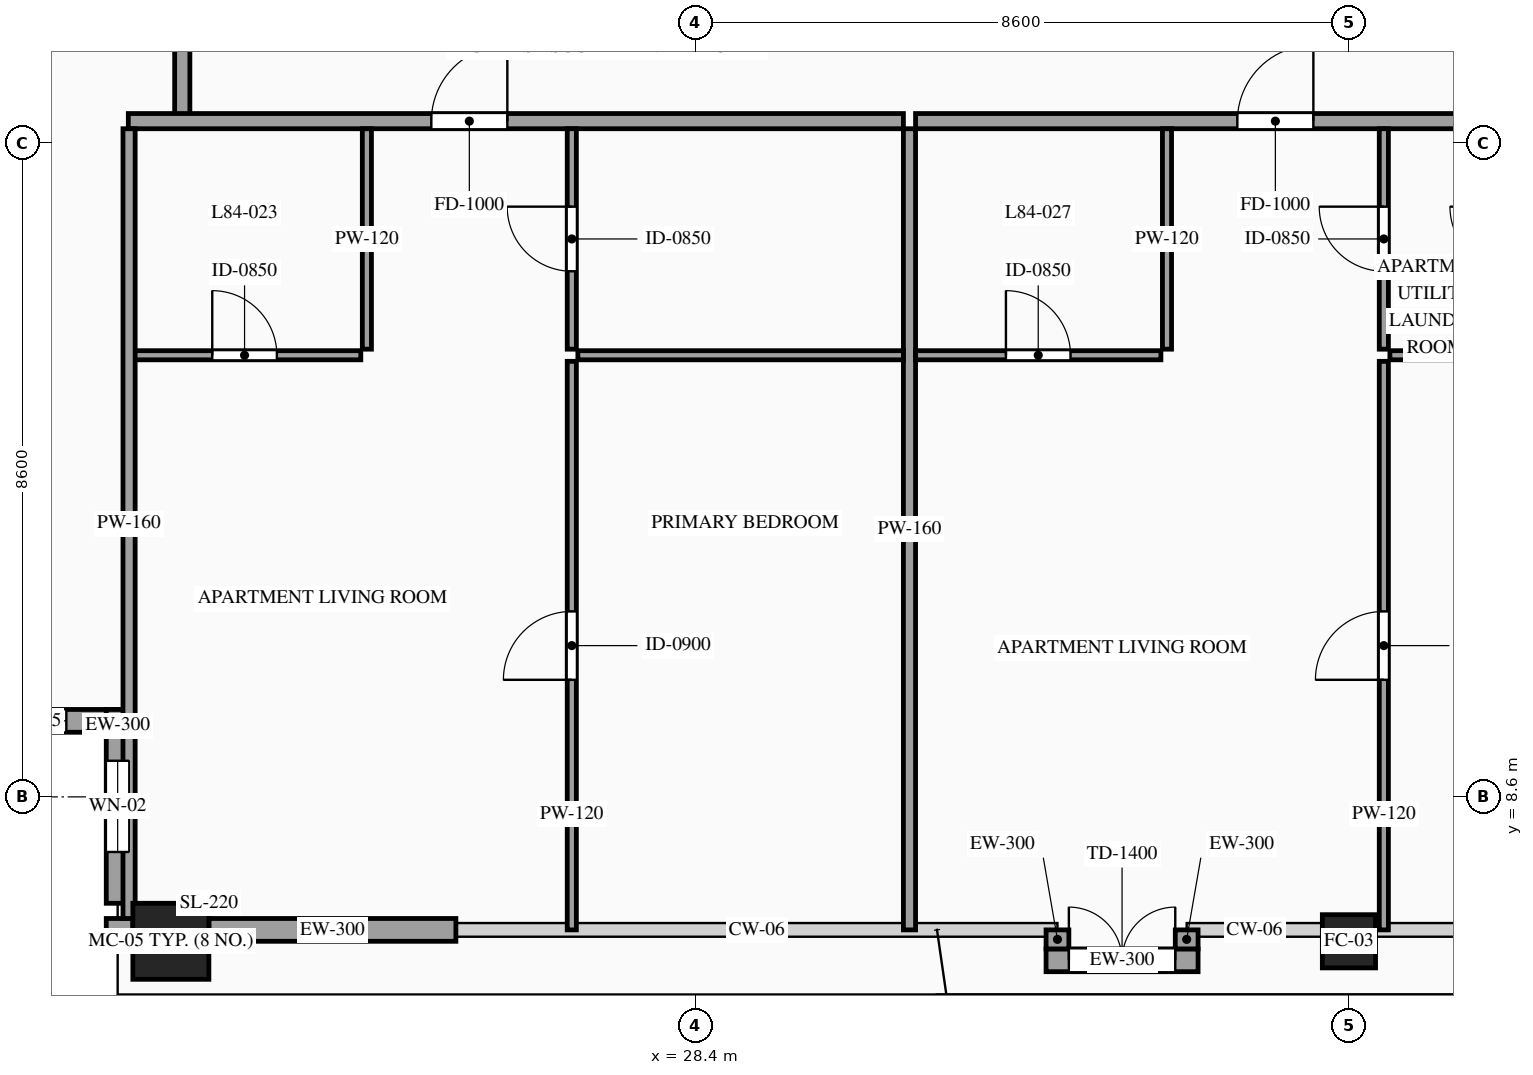
"""IFC4 building model, lengths in metres.
Left out: names, types, materials, properties, quantities, classifications, styles, units other than length and angle.
Written with IfcOpenShell. Run it as: python <this file> out.ifc"""

import sys

from ifc_helpers import new_model, si_unit, direction, frame, frame_2d, origin, origin_2d, place, context, subcontext, project, spatial, rectangle, hollow_rectangle, extrude, source, transform, mapped, element, fill, save


model = new_model("IFC4")
c1 = context("Model", 3, precision=1e-05, world=origin(), true_north=direction((0.0, 1.0)))
c2 = subcontext(c1, "Body", "Model", "MODEL_VIEW")
j1 = project(units=[si_unit("LENGTHUNIT", "METRE"), si_unit("PLANEANGLEUNIT", "RADIAN")], contexts=[c1])
p1 = place(None, origin())
s1 = spatial("IfcSite", under=j1, at=p1, CompositionType="ELEMENT")
p2 = place(p1, origin())
s2 = spatial("IfcBuilding", under=s1, at=p2, CompositionType="ELEMENT")
p3 = place(p2, frame((0.0, 0.0, 314.7)))
s3 = spatial("IfcBuildingStorey", under=s2, at=p3, CompositionType="ELEMENT", Elevation=314.7)
m1 = source(origin(), c2, "Body", "SweptSolid", [
    extrude(hollow_rectangle(XDim=1.0, YDim=1.0, WallThickness=0.048, at=origin_2d()), origin(), (0.0, 0.0, 1.0), 3.5),
])
p4 = place(p3, frame((21.5, 6.7, 0.0), z_axis=(0.0, 0.0, 1.0), x_axis=(1.0, 0.0, 0.0)))
e1 = element("IfcColumn", 1, at=p4, inside=s3, PredefinedType="COLUMN", context=c2, shape_type="MappedRepresentation", body=[
    mapped(m1, transform((0.0, 0.0, 0.0), scale=1.0)),
])
m2 = source(origin(), c2, "Body", "SweptSolid", [
    extrude(hollow_rectangle(XDim=0.7, YDim=0.7, WallThickness=0.032, at=origin_2d()), origin(), (0.0, 0.0, 1.0), 3.5),
])
p5 = place(p3, frame((37.0, 6.7, 0.0), z_axis=(0.0, 0.0, 1.0), x_axis=(1.0, 0.0, 0.0)))
e2 = element("IfcColumn", 2, at=p5, inside=s3, PredefinedType="COLUMN", context=c2, shape_type="MappedRepresentation", body=[
    mapped(m2, transform((0.0, 0.0, 0.0), scale=1.0)),
])
p6 = place(p3, frame((18.4, 9.6, 0.0), z_axis=(0.0, 0.0, 1.0), x_axis=(1.0, 0.0, 0.0)))
e3 = element("IfcWall", 3, at=p6, inside=s3, PredefinedType="SOLIDWALL", context=c2, shape_type="SweptSolid", body=[
    extrude(rectangle(XDim=2.55, YDim=0.3, at=frame_2d((1.275, 0.0))), origin(), (0.0, 0.0, 1.0), 3.28),
])
p7 = place(p6, frame((0.825, 0.0, 0.85)))
e4 = element("IfcOpeningElement", 4, at=p7, cuts=e3, PredefinedType="OPENING", context=c2, shape_type="SweptSolid", body=[
    extrude(rectangle(XDim=0.9, YDim=1.5, at=frame_2d((0.45, 0.75))), frame((0.0, 0.165, 0.0), z_axis=(0.0, -1.0, 0.0), x_axis=(1.0, 0.0, 0.0)), (0.0, 0.0, 1.0), 0.33),
])
p8 = place(p3, frame((20.8, 9.75, 0.0), z_axis=(0.0, 0.0, 1.0), x_axis=(0.0, -1.0, 0.0)))
e5 = element("IfcWall", 5, at=p8, inside=s3, PredefinedType="SOLIDWALL", context=c2, shape_type="SweptSolid", body=[
    extrude(rectangle(XDim=2.55, YDim=0.3, at=frame_2d((1.275, 0.0))), origin(), (0.0, 0.0, 1.0), 3.28),
])
p9 = place(p8, frame((0.675, 0.0, 0.85)))
e6 = element("IfcOpeningElement", 6, at=p9, cuts=e5, PredefinedType="OPENING", context=c2, shape_type="SweptSolid", body=[
    extrude(rectangle(XDim=1.2, YDim=2.1, at=frame_2d((0.6, 1.05))), frame((0.0, 0.165, 0.0), z_axis=(0.0, -1.0, 0.0), x_axis=(1.0, 0.0, 0.0)), (0.0, 0.0, 1.0), 0.33),
])
m3 = source(origin(), c2, "Body", "SweptSolid", [
    extrude(rectangle(XDim=0.35, YDim=0.3, at=frame_2d((0.175, 0.0))), origin(), (0.0, 0.0, 1.0), 3.28),
])
p10 = place(p3, frame((20.65, 6.85, 0.0), z_axis=(0.0, 0.0, 1.0), x_axis=(1.0, 0.0, 0.0)))
e7 = element("IfcWall", 7, at=p10, inside=s3, PredefinedType="SOLIDWALL", context=c2, shape_type="MappedRepresentation", body=[
    mapped(m3, transform((0.0, 0.0, 0.0), scale=1.0)),
])
m4 = source(origin(), c2, "Body", "SweptSolid", [
    extrude(rectangle(XDim=3.25, YDim=0.3, at=frame_2d((1.625, 0.0))), origin(), (0.0, 0.0, 1.0), 2.885),
])
p11 = place(p3, frame((22.0, 6.85, 0.0), z_axis=(0.0, 0.0, 1.0), x_axis=(1.0, 0.0, 0.0)))
e8 = element("IfcWall", 8, at=p11, inside=s3, PredefinedType="SOLIDWALL", context=c2, shape_type="MappedRepresentation", body=[
    mapped(m4, transform((0.0, 0.0, 0.0), scale=1.0)),
])
p12 = place(p3, frame((33.015, 6.45, 0.0), z_axis=(0.0, 0.0, 1.0), x_axis=(1.0, 0.0, 0.0)))
e9 = element("IfcWall", 9, at=p12, inside=s3, PredefinedType="SOLIDWALL", context=c2, shape_type="SweptSolid", body=[
    extrude(rectangle(XDim=2.0, YDim=0.3, at=frame_2d((1.0, 0.0))), origin(), (0.0, 0.0, 1.0), 2.885),
])
p13 = place(p12, frame((0.3, 0.0, 0.0)))
e10 = element("IfcOpeningElement", 10, at=p13, cuts=e9, PredefinedType="OPENING", context=c2, shape_type="SweptSolid", body=[
    extrude(rectangle(XDim=1.4, YDim=2.3, at=frame_2d((0.7, 1.15))), frame((0.0, 0.165, 0.0), z_axis=(0.0, -1.0, 0.0), x_axis=(1.0, 0.0, 0.0)), (0.0, 0.0, 1.0), 0.33),
])
m5 = source(origin(), c2, "Body", "SweptSolid", [
    extrude(rectangle(XDim=0.25, YDim=0.3, at=frame_2d((0.125, 0.0))), origin(), (0.0, 0.0, 1.0), 3.28),
])
for number, where, z_axis, x_axis in (
    (11, (33.165, 6.85, 0.0), (0.0, 0.0, 1.0), (0.0, -1.0, 0.0)),
    (12, (34.865, 6.6, 0.0), (0.0, 0.0, 1.0), (0.0, 1.0, 0.0)),
):
    element("IfcWall", number, at=place(p3, frame(where, z_axis=z_axis, x_axis=x_axis)), inside=s3, PredefinedType="SOLIDWALL", context=c2, shape_type="MappedRepresentation", body=[
        mapped(m5, transform((0.0, 0.0, 0.0), scale=1.0)),
    ])
m6 = source(origin(), c2, "Body", "SweptSolid", [
    extrude(rectangle(XDim=1.7, YDim=0.2, at=frame_2d((0.85, 0.0))), origin(), (0.0, 0.0, 1.0), 3.28),
])
p14 = place(p3, frame((21.65, 17.55, 0.0), z_axis=(0.0, 0.0, 1.0), x_axis=(0.0, 1.0, 0.0)))
e13 = element("IfcWall", 13, at=p14, inside=s3, PredefinedType="PARTITIONING", context=c2, shape_type="MappedRepresentation", body=[
    mapped(m6, transform((0.0, 0.0, 0.0), scale=1.0)),
])
p15 = place(p3, frame((20.94, 17.49, 0.0), z_axis=(0.0, 0.0, 1.0), x_axis=(1.0, 0.0, 0.0)))
e14 = element("IfcWall", 14, at=p15, inside=s3, PredefinedType="PARTITIONING", context=c2, shape_type="SweptSolid", body=[
    extrude(rectangle(XDim=10.198, YDim=0.2, at=frame_2d((5.099, 0.0))), origin(), (0.0, 0.0, 1.0), 3.28),
])
p16 = place(p15, frame((3.987, 0.0, 0.0)))
e15 = element("IfcOpeningElement", 15, at=p16, cuts=e14, PredefinedType="OPENING", context=c2, shape_type="SweptSolid", body=[
    extrude(rectangle(XDim=1.0, YDim=2.2, at=frame_2d((0.5, 1.1))), frame((0.0, 0.115, 0.0), z_axis=(0.0, -1.0, 0.0), x_axis=(1.0, 0.0, 0.0)), (0.0, 0.0, 1.0), 0.23),
])
m7 = source(origin(), c2, "Body", "SweptSolid", [
    extrude(rectangle(XDim=10.54, YDim=0.16, at=frame_2d((5.27, 0.0))), origin(), (0.0, 0.0, 1.0), 3.28),
])
p17 = place(p3, frame((31.218, 6.85, 0.0), z_axis=(0.0, 0.0, 1.0), x_axis=(0.0, 1.0, 0.0)))
e16 = element("IfcWall", 16, at=p17, inside=s3, PredefinedType="PARTITIONING", context=c2, shape_type="MappedRepresentation", body=[
    mapped(m7, transform((0.0, 0.0, 0.0), scale=1.0)),
])
p18 = place(p3, frame((20.94, 14.41, 0.0), z_axis=(0.0, 0.0, 1.0), x_axis=(1.0, 0.0, 0.0)))
e17 = element("IfcWall", 17, at=p18, inside=s3, PredefinedType="PARTITIONING", context=c2, shape_type="SweptSolid", body=[
    extrude(rectangle(XDim=3.059, YDim=0.12, at=frame_2d((1.53, 0.0))), origin(), (0.0, 0.0, 1.0), 3.28),
])
p19 = place(p18, frame((1.104, 0.0, 0.0)))
e18 = element("IfcOpeningElement", 18, at=p19, cuts=e17, PredefinedType="OPENING", context=c2, shape_type="SweptSolid", body=[
    extrude(rectangle(XDim=0.85, YDim=2.1, at=frame_2d((0.425, 1.05))), frame((0.0, 0.075, 0.0), z_axis=(0.0, -1.0, 0.0), x_axis=(1.0, 0.0, 0.0)), (0.0, 0.0, 1.0), 0.15),
])
m8 = source(origin(), c2, "Body", "SweptSolid", [
    extrude(rectangle(XDim=2.9, YDim=0.12, at=frame_2d((1.45, 0.0))), origin(), (0.0, 0.0, 1.0), 3.28),
])
p20 = place(p3, frame((24.079, 14.49, 0.0), z_axis=(0.0, 0.0, 1.0), x_axis=(0.0, 1.0, 0.0)))
e19 = element("IfcWall", 19, at=p20, inside=s3, PredefinedType="PARTITIONING", context=c2, shape_type="MappedRepresentation", body=[
    mapped(m8, transform((0.0, 0.0, 0.0), scale=1.0)),
])
m9 = source(origin(), c2, "Body", "SweptSolid", [
    extrude(rectangle(XDim=4.283, YDim=0.12, at=frame_2d((2.142, 0.0))), origin(), (0.0, 0.0, 1.0), 3.28),
])
p21 = place(p3, frame((26.855, 14.41, 0.0), z_axis=(0.0, 0.0, 1.0), x_axis=(1.0, 0.0, 0.0)))
e20 = element("IfcWall", 20, at=p21, inside=s3, PredefinedType="PARTITIONING", context=c2, shape_type="MappedRepresentation", body=[
    mapped(m9, transform((0.0, 0.0, 0.0), scale=1.0)),
])
p22 = place(p3, frame((26.775, 14.49, 0.0), z_axis=(0.0, 0.0, 1.0), x_axis=(0.0, 1.0, 0.0)))
e21 = element("IfcWall", 21, at=p22, inside=s3, PredefinedType="PARTITIONING", context=c2, shape_type="SweptSolid", body=[
    extrude(rectangle(XDim=2.9, YDim=0.12, at=frame_2d((1.45, 0.0))), origin(), (0.0, 0.0, 1.0), 3.28),
])
p23 = place(p22, frame((1.025, 0.0, 0.0)))
e22 = element("IfcOpeningElement", 22, at=p23, cuts=e21, PredefinedType="OPENING", context=c2, shape_type="SweptSolid", body=[
    extrude(rectangle(XDim=0.85, YDim=2.1, at=frame_2d((0.425, 1.05))), frame((0.0, 0.075, 0.0), z_axis=(0.0, -1.0, 0.0), x_axis=(1.0, 0.0, 0.0)), (0.0, 0.0, 1.0), 0.15),
])
p24 = place(p3, frame((26.775, 6.85, 0.0), z_axis=(0.0, 0.0, 1.0), x_axis=(0.0, 1.0, 0.0)))
e23 = element("IfcWall", 23, at=p24, inside=s3, PredefinedType="PARTITIONING", context=c2, shape_type="SweptSolid", body=[
    extrude(rectangle(XDim=7.48, YDim=0.12, at=frame_2d((3.74, 0.0))), origin(), (0.0, 0.0, 1.0), 3.28),
])
p25 = place(p24, frame((3.29, 0.0, 0.0)))
e24 = element("IfcOpeningElement", 24, at=p25, cuts=e23, PredefinedType="OPENING", context=c2, shape_type="SweptSolid", body=[
    extrude(rectangle(XDim=0.9, YDim=2.15, at=frame_2d((0.45, 1.075))), frame((0.0, 0.075, 0.0), z_axis=(0.0, -1.0, 0.0), x_axis=(1.0, 0.0, 0.0)), (0.0, 0.0, 1.0), 0.15),
])
p26 = place(p3, frame((31.298, 17.49, 0.0), z_axis=(0.0, 0.0, 1.0), x_axis=(1.0, 0.0, 0.0)))
e25 = element("IfcWall", 25, at=p26, inside=s3, PredefinedType="PARTITIONING", context=c2, shape_type="SweptSolid", body=[
    extrude(rectangle(XDim=10.761, YDim=0.2, at=frame_2d((5.38, 0.0))), origin(), (0.0, 0.0, 1.0), 3.28),
])
p27 = place(p26, frame((4.234, 0.0, 0.0)))
e26 = element("IfcOpeningElement", 26, at=p27, cuts=e25, PredefinedType="OPENING", context=c2, shape_type="SweptSolid", body=[
    extrude(rectangle(XDim=1.0, YDim=2.2, at=frame_2d((0.5, 1.1))), frame((0.0, 0.115, 0.0), z_axis=(0.0, -1.0, 0.0), x_axis=(1.0, 0.0, 0.0)), (0.0, 0.0, 1.0), 0.23),
])
p28 = place(p3, frame((31.298, 14.41, 0.0), z_axis=(0.0, 0.0, 1.0), x_axis=(1.0, 0.0, 0.0)))
e27 = element("IfcWall", 27, at=p28, inside=s3, PredefinedType="PARTITIONING", context=c2, shape_type="SweptSolid", body=[
    extrude(rectangle(XDim=3.228, YDim=0.12, at=frame_2d((1.614, 0.0))), origin(), (0.0, 0.0, 1.0), 3.28),
])
p29 = place(p28, frame((1.189, 0.0, 0.0)))
e28 = element("IfcOpeningElement", 28, at=p29, cuts=e27, PredefinedType="OPENING", context=c2, shape_type="SweptSolid", body=[
    extrude(rectangle(XDim=0.85, YDim=2.1, at=frame_2d((0.425, 1.05))), frame((0.0, 0.075, 0.0), z_axis=(0.0, -1.0, 0.0), x_axis=(1.0, 0.0, 0.0)), (0.0, 0.0, 1.0), 0.15),
])
p30 = place(p3, frame((34.606, 14.49, 0.0), z_axis=(0.0, 0.0, 1.0), x_axis=(0.0, 1.0, 0.0)))
e29 = element("IfcWall", 29, at=p30, inside=s3, PredefinedType="PARTITIONING", context=c2, shape_type="MappedRepresentation", body=[
    mapped(m8, transform((0.0, 0.0, 0.0), scale=1.0)),
])
m10 = source(origin(), c2, "Body", "SweptSolid", [
    extrude(rectangle(XDim=4.52, YDim=0.12, at=frame_2d((2.26, 0.0))), origin(), (0.0, 0.0, 1.0), 3.28),
])
p31 = place(p3, frame((37.539, 14.41, 0.0), z_axis=(0.0, 0.0, 1.0), x_axis=(1.0, 0.0, 0.0)))
e30 = element("IfcWall", 30, at=p31, inside=s3, PredefinedType="PARTITIONING", context=c2, shape_type="MappedRepresentation", body=[
    mapped(m10, transform((0.0, 0.0, 0.0), scale=1.0)),
])
p32 = place(p3, frame((37.459, 6.85, 0.0), z_axis=(0.0, 0.0, 1.0), x_axis=(0.0, 1.0, 0.0)))
e31 = element("IfcWall", 31, at=p32, inside=s3, PredefinedType="PARTITIONING", context=c2, shape_type="SweptSolid", body=[
    extrude(rectangle(XDim=7.48, YDim=0.12, at=frame_2d((3.74, 0.0))), origin(), (0.0, 0.0, 1.0), 3.28),
])
p33 = place(p32, frame((3.29, 0.0, 0.0)))
e32 = element("IfcOpeningElement", 32, at=p33, cuts=e31, PredefinedType="OPENING", context=c2, shape_type="SweptSolid", body=[
    extrude(rectangle(XDim=0.9, YDim=2.15, at=frame_2d((0.45, 1.075))), frame((0.0, 0.075, 0.0), z_axis=(0.0, -1.0, 0.0), x_axis=(1.0, 0.0, 0.0)), (0.0, 0.0, 1.0), 0.15),
])
p34 = place(p3, frame((37.459, 14.49, 0.0), z_axis=(0.0, 0.0, 1.0), x_axis=(0.0, 1.0, 0.0)))
e33 = element("IfcWall", 33, at=p34, inside=s3, PredefinedType="PARTITIONING", context=c2, shape_type="SweptSolid", body=[
    extrude(rectangle(XDim=2.9, YDim=0.12, at=frame_2d((1.45, 0.0))), origin(), (0.0, 0.0, 1.0), 3.28),
])
p35 = place(p34, frame((1.025, 0.0, 0.0)))
e34 = element("IfcOpeningElement", 34, at=p35, cuts=e33, PredefinedType="OPENING", context=c2, shape_type="SweptSolid", body=[
    extrude(rectangle(XDim=0.85, YDim=2.1, at=frame_2d((0.425, 1.05))), frame((0.0, 0.075, 0.0), z_axis=(0.0, -1.0, 0.0), x_axis=(1.0, 0.0, 0.0)), (0.0, 0.0, 1.0), 0.15),
])
m11 = source(origin(), c2, "Body", "SweptSolid", [
    extrude(rectangle(XDim=10.39, YDim=0.16, at=frame_2d((5.195, 0.0))), origin(), (0.0, 0.0, 1.0), 3.28),
])
p36 = place(p3, frame((20.95, 7.0, 0.0), z_axis=(0.0, 0.0, 1.0), x_axis=(0.0, 1.0, 0.0)))
e35 = element("IfcWall", 35, at=p36, inside=s3, PredefinedType="PARTITIONING", context=c2, shape_type="MappedRepresentation", body=[
    mapped(m11, transform((0.0, 0.0, 0.0), scale=1.0)),
])
m12 = source(origin(), c2, "Body", "SweptSolid", [
    extrude(rectangle(XDim=0.9, YDim=1.5, at=frame_2d((0.45, 0.75))), frame((0.0, 0.03, 0.0), z_axis=(0.0, -1.0, 0.0), x_axis=(1.0, 0.0, 0.0)), (0.0, 0.0, 1.0), 0.06),
])
p37 = place(p7, origin())
e36 = element("IfcWindow", 36, at=p37, inside=s3, PartitioningType="SINGLE_PANEL", PredefinedType="WINDOW", context=c2, shape_type="MappedRepresentation", body=[
    mapped(m12, transform((0.0, 0.0, 0.0), scale=1.0)),
])
fill(e4, e36)
m13 = source(origin(), c2, "Body", "SweptSolid", [
    extrude(rectangle(XDim=1.2, YDim=2.1, at=frame_2d((0.6, 1.05))), frame((0.0, 0.03, 0.0), z_axis=(0.0, -1.0, 0.0), x_axis=(1.0, 0.0, 0.0)), (0.0, 0.0, 1.0), 0.06),
])
p38 = place(p9, origin())
e37 = element("IfcWindow", 37, at=p38, inside=s3, PartitioningType="SINGLE_PANEL", PredefinedType="WINDOW", context=c2, shape_type="MappedRepresentation", body=[
    mapped(m13, transform((0.0, 0.0, 0.0), scale=1.0)),
])
fill(e6, e37)
m14 = source(origin(), c2, "Body", "SweptSolid", [
    extrude(rectangle(XDim=1.4, YDim=2.3, at=frame_2d((0.7, 1.15))), frame((0.0, 0.025, 0.0), z_axis=(0.0, -1.0, 0.0), x_axis=(1.0, 0.0, 0.0)), (0.0, 0.0, 1.0), 0.05),
])
p39 = place(p13, origin())
e38 = element("IfcDoor", 38, at=p39, inside=s3, OperationType="DOUBLE_DOOR_SINGLE_SWING", PredefinedType="DOOR", context=c2, shape_type="MappedRepresentation", body=[
    mapped(m14, transform((0.0, 0.0, 0.0), scale=1.0)),
])
fill(e10, e38)
m15 = source(origin(), c2, "Body", "SweptSolid", [
    extrude(rectangle(XDim=1.0, YDim=2.2, at=frame_2d((0.5, 1.1))), frame((0.0, 0.025, 0.0), z_axis=(0.0, -1.0, 0.0), x_axis=(1.0, 0.0, 0.0)), (0.0, 0.0, 1.0), 0.05),
])
p40 = place(p16, origin())
e39 = element("IfcDoor", 39, at=p40, inside=s3, OperationType="SINGLE_SWING_RIGHT", PredefinedType="DOOR", context=c2, shape_type="MappedRepresentation", body=[
    mapped(m15, transform((0.0, 0.0, 0.0), scale=1.0)),
])
fill(e15, e39)
m16 = source(origin(), c2, "Body", "SweptSolid", [
    extrude(rectangle(XDim=0.85, YDim=2.1, at=frame_2d((0.425, 1.05))), frame((0.0, 0.025, 0.0), z_axis=(0.0, -1.0, 0.0), x_axis=(1.0, 0.0, 0.0)), (0.0, 0.0, 1.0), 0.05),
])
p41 = place(p19, origin())
e40 = element("IfcDoor", 40, at=p41, inside=s3, OperationType="SINGLE_SWING_LEFT", PredefinedType="DOOR", context=c2, shape_type="MappedRepresentation", body=[
    mapped(m16, transform((0.0, 0.0, 0.0), scale=1.0)),
])
fill(e18, e40)
p42 = place(p23, origin())
e41 = element("IfcDoor", 41, at=p42, inside=s3, OperationType="SINGLE_SWING_RIGHT", PredefinedType="DOOR", context=c2, shape_type="MappedRepresentation", body=[
    mapped(m16, transform((0.0, 0.0, 0.0), scale=1.0)),
])
fill(e22, e41)
m17 = source(origin(), c2, "Body", "SweptSolid", [
    extrude(rectangle(XDim=0.9, YDim=2.15, at=frame_2d((0.45, 1.075))), frame((0.0, 0.025, 0.0), z_axis=(0.0, -1.0, 0.0), x_axis=(1.0, 0.0, 0.0)), (0.0, 0.0, 1.0), 0.05),
])
p43 = place(p25, origin())
e42 = element("IfcDoor", 42, at=p43, inside=s3, OperationType="SINGLE_SWING_LEFT", PredefinedType="DOOR", context=c2, shape_type="MappedRepresentation", body=[
    mapped(m17, transform((0.0, 0.0, 0.0), scale=1.0)),
])
fill(e24, e42)
p44 = place(p27, origin())
e43 = element("IfcDoor", 43, at=p44, inside=s3, OperationType="SINGLE_SWING_RIGHT", PredefinedType="DOOR", context=c2, shape_type="MappedRepresentation", body=[
    mapped(m15, transform((0.0, 0.0, 0.0), scale=1.0)),
])
fill(e26, e43)
p45 = place(p29, origin())
e44 = element("IfcDoor", 44, at=p45, inside=s3, OperationType="SINGLE_SWING_LEFT", PredefinedType="DOOR", context=c2, shape_type="MappedRepresentation", body=[
    mapped(m16, transform((0.0, 0.0, 0.0), scale=1.0)),
])
fill(e28, e44)
p46 = place(p33, origin())
e45 = element("IfcDoor", 45, at=p46, inside=s3, OperationType="SINGLE_SWING_LEFT", PredefinedType="DOOR", context=c2, shape_type="MappedRepresentation", body=[
    mapped(m17, transform((0.0, 0.0, 0.0), scale=1.0)),
])
fill(e32, e45)
p47 = place(p35, origin())
e46 = element("IfcDoor", 46, at=p47, inside=s3, OperationType="SINGLE_SWING_RIGHT", PredefinedType="DOOR", context=c2, shape_type="MappedRepresentation", body=[
    mapped(m16, transform((0.0, 0.0, 0.0), scale=1.0)),
])
fill(e34, e46)
save(model, sys.argv[1])
